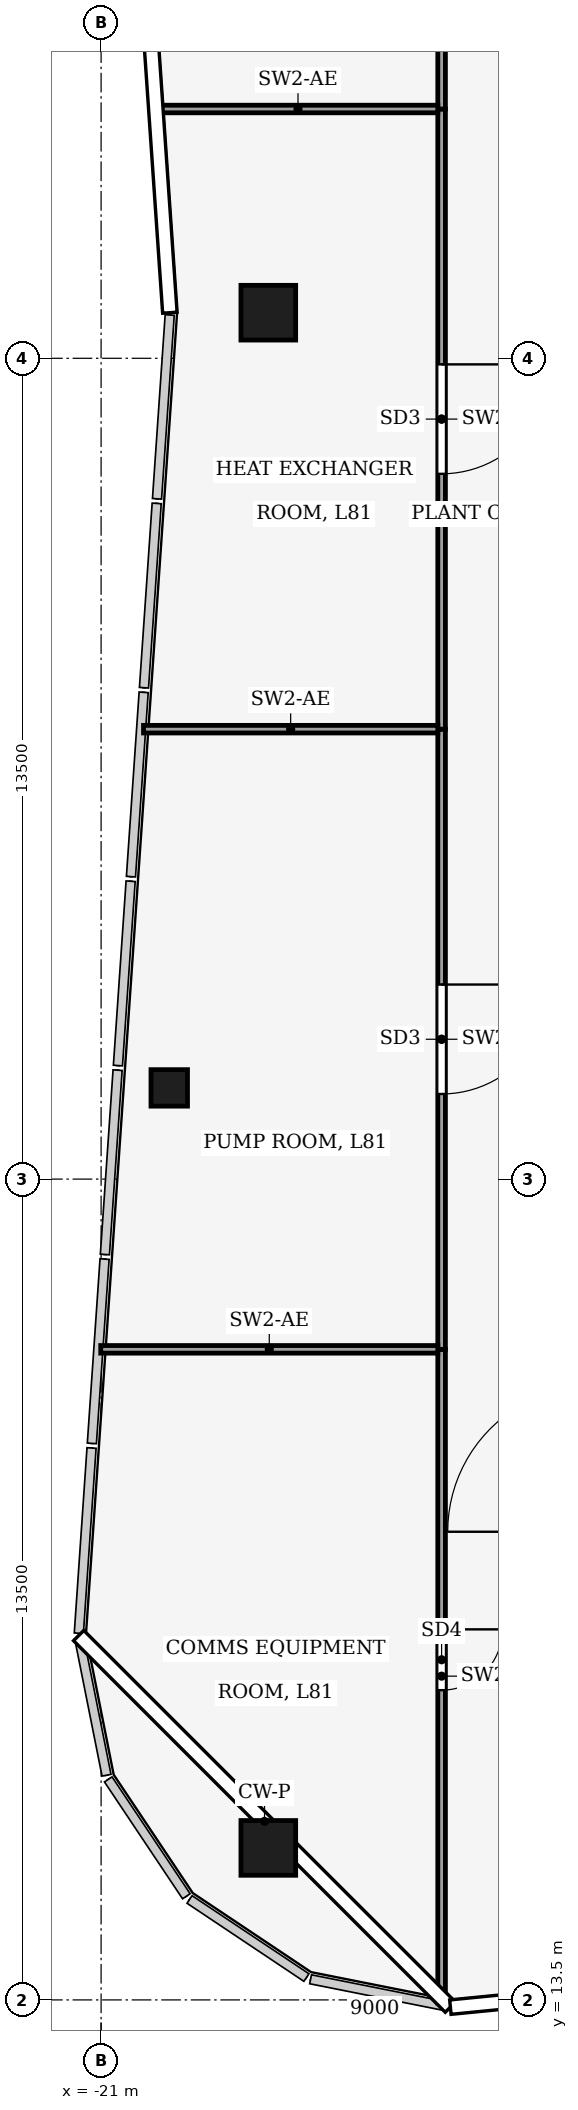
"""IFC4 building model, lengths in metres.
Left out: names, types, materials, properties, quantities, classifications, styles, units other than length and angle.
Written with IfcOpenShell. Run it as: python <this file> out.ifc"""

import sys

from ifc_helpers import new_model, si_unit, direction, frame, frame_2d, origin, origin_2d, place, context, subcontext, project, spatial, rectangle, hollow_rectangle, extrude, element, fill, save


model = new_model("IFC4")
c1 = context("Model", 3, precision=1e-05, world=origin(), true_north=direction((0.0, 1.0)))
c2 = subcontext(c1, "Body", "Model", "MODEL_VIEW")
j1 = project(units=[si_unit("LENGTHUNIT", "METRE"), si_unit("PLANEANGLEUNIT", "RADIAN")], contexts=[c1])
p1 = place(None, origin())
s1 = spatial("IfcSite", under=j1, at=p1, CompositionType="ELEMENT")
p2 = place(p1, origin())
s2 = spatial("IfcBuilding", under=s1, at=p2, CompositionType="ELEMENT")
p3 = place(p2, frame((0.0, 0.0, 359.5)))
s3 = spatial("IfcBuildingStorey", under=s2, at=p3, CompositionType="ELEMENT", Elevation=359.5)
for number, where, z_axis, x_axis in (
    (1, (-18.25, 16.0, 0.0), (0.0, 0.0, 1.0), (1.0, 0.0, 0.0)),
    (2, (-18.25, 41.25, 0.0), (0.0, 0.0, 1.0), (1.0, 0.0, 0.0)),
):
    element("IfcColumn", number, at=place(p3, frame(where, z_axis=z_axis, x_axis=x_axis)), inside=s3, PredefinedType="COLUMN", context=c2, shape_type="SweptSolid", body=[
        extrude(hollow_rectangle(XDim=0.9, YDim=0.9, WallThickness=0.04, at=origin_2d()), origin(), (0.0, 0.0, 1.0), 4.5),
    ])
p4 = place(p3, frame((-19.879, 28.5, 0.0), z_axis=(0.0, 0.0, 1.0), x_axis=(1.0, 0.0, 0.0)))
e3 = element("IfcColumn", 3, at=p4, inside=s3, PredefinedType="COLUMN", context=c2, shape_type="SweptSolid", body=[
    extrude(hollow_rectangle(XDim=0.6, YDim=0.6, WallThickness=0.025, at=origin_2d()), origin(), (0.0, 0.0, 1.0), 4.5),
])
p5 = place(p3, frame((-15.4, 24.2, 0.0), z_axis=(0.0, 0.0, 1.0), x_axis=(0.0, -1.0, 0.0)))
e4 = element("IfcWall", 4, at=p5, inside=s3, PredefinedType="PARTITIONING", context=c2, shape_type="SweptSolid", body=[
    extrude(rectangle(XDim=10.75, YDim=0.125, at=frame_2d((5.375, 0.0))), origin(), (0.0, 0.0, 1.0), 3.312),
])
p6 = place(p5, frame((4.605, 0.0, 0.0)))
e5 = element("IfcOpeningElement", 5, at=p6, cuts=e4, PredefinedType="OPENING", context=c2, shape_type="SweptSolid", body=[
    extrude(rectangle(XDim=1.0, YDim=2.1, at=frame_2d((0.5, 1.05))), frame((0.0, 0.073, 0.0), z_axis=(0.0, -1.0, 0.0), x_axis=(1.0, 0.0, 0.0)), (0.0, 0.0, 1.0), 0.145),
])
p7 = place(p3, frame((-15.4, 34.4, 0.0), z_axis=(0.0, 0.0, 1.0), x_axis=(0.0, -1.0, 0.0)))
e6 = element("IfcWall", 6, at=p7, inside=s3, PredefinedType="PARTITIONING", context=c2, shape_type="SweptSolid", body=[
    extrude(rectangle(XDim=10.2, YDim=0.125, at=frame_2d((5.1, 0.0))), origin(), (0.0, 0.0, 1.0), 4.02),
])
p8 = place(p7, frame((4.2, 0.0, 0.0)))
e7 = element("IfcOpeningElement", 7, at=p8, cuts=e6, PredefinedType="OPENING", context=c2, shape_type="SweptSolid", body=[
    extrude(rectangle(XDim=1.8, YDim=2.4, at=frame_2d((0.9, 1.2))), frame((0.0, 0.073, 0.0), z_axis=(0.0, -1.0, 0.0), x_axis=(1.0, 0.0, 0.0)), (0.0, 0.0, 1.0), 0.145),
])
p9 = place(p3, frame((-15.4, 44.6, 0.0), z_axis=(0.0, 0.0, 1.0), x_axis=(0.0, -1.0, 0.0)))
e8 = element("IfcWall", 8, at=p9, inside=s3, PredefinedType="PARTITIONING", context=c2, shape_type="SweptSolid", body=[
    extrude(rectangle(XDim=10.2, YDim=0.125, at=frame_2d((5.1, 0.0))), origin(), (0.0, 0.0, 1.0), 3.62),
])
p10 = place(p9, frame((4.2, 0.0, 0.0)))
e9 = element("IfcOpeningElement", 9, at=p10, cuts=e8, PredefinedType="OPENING", context=c2, shape_type="SweptSolid", body=[
    extrude(rectangle(XDim=1.8, YDim=2.4, at=frame_2d((0.9, 1.2))), frame((0.0, 0.073, 0.0), z_axis=(0.0, -1.0, 0.0), x_axis=(1.0, 0.0, 0.0)), (0.0, 0.0, 1.0), 0.145),
])
p11 = place(p3, frame((-15.4, 54.8, 0.0), z_axis=(0.0, 0.0, 1.0), x_axis=(0.0, -1.0, 0.0)))
e10 = element("IfcWall", 10, at=p11, inside=s3, PredefinedType="PARTITIONING", context=c2, shape_type="SweptSolid", body=[
    extrude(rectangle(XDim=10.2, YDim=0.125, at=frame_2d((5.1, 0.0))), origin(), (0.0, 0.0, 1.0), 3.83),
])
p12 = place(p11, frame((4.6, 0.0, 0.0)))
e11 = element("IfcOpeningElement", 11, at=p12, cuts=e10, PredefinedType="OPENING", context=c2, shape_type="SweptSolid", body=[
    extrude(rectangle(XDim=1.0, YDim=2.1, at=frame_2d((0.5, 1.05))), frame((0.0, 0.073, 0.0), z_axis=(0.0, -1.0, 0.0), x_axis=(1.0, 0.0, 0.0)), (0.0, 0.0, 1.0), 0.145),
])
p13 = place(p3, frame((-21.006, 24.2, 0.0), z_axis=(0.0, 0.0, 1.0), x_axis=(1.0, 0.0, 0.0)))
e12 = element("IfcWall", 12, at=p13, inside=s3, PredefinedType="PARTITIONING", context=c2, shape_type="SweptSolid", body=[
    extrude(rectangle(XDim=5.543, YDim=0.125, at=frame_2d((2.772, 0.0))), origin(), (0.0, 0.0, 1.0), 3.52),
])
p14 = place(p3, frame((-20.302, 34.4, 0.0), z_axis=(0.0, 0.0, 1.0), x_axis=(1.0, 0.0, 0.0)))
e13 = element("IfcWall", 13, at=p14, inside=s3, PredefinedType="PARTITIONING", context=c2, shape_type="SweptSolid", body=[
    extrude(rectangle(XDim=4.84, YDim=0.125, at=frame_2d((2.42, 0.0))), origin(), (0.0, 0.0, 1.0), 3.52),
])
p15 = place(p3, frame((-20.061, 44.6, 0.0), z_axis=(0.0, 0.0, 1.0), x_axis=(1.0, 0.0, 0.0)))
e14 = element("IfcWall", 14, at=p15, inside=s3, PredefinedType="PARTITIONING", context=c2, shape_type="SweptSolid", body=[
    extrude(rectangle(XDim=4.599, YDim=0.125, at=frame_2d((2.299, 0.0))), origin(), (0.0, 0.0, 1.0), 3.52),
])
p16 = place(p6, origin())
e15 = element("IfcDoor", 15, at=p16, inside=s3, OperationType="SINGLE_SWING_LEFT", PredefinedType="DOOR", context=c2, shape_type="SweptSolid", body=[
    extrude(rectangle(XDim=1.0, YDim=2.1, at=frame_2d((0.5, 1.05))), frame((0.0, 0.025, 0.0), z_axis=(0.0, -1.0, 0.0), x_axis=(1.0, 0.0, 0.0)), (0.0, 0.0, 1.0), 0.05),
])
fill(e5, e15)
p17 = place(p8, origin())
e16 = element("IfcDoor", 16, at=p17, inside=s3, OperationType="DOUBLE_DOOR_SINGLE_SWING", PredefinedType="DOOR", context=c2, shape_type="SweptSolid", body=[
    extrude(rectangle(XDim=1.8, YDim=2.4, at=frame_2d((0.9, 1.2))), frame((0.0, 0.025, 0.0), z_axis=(0.0, -1.0, 0.0), x_axis=(1.0, 0.0, 0.0)), (0.0, 0.0, 1.0), 0.05),
])
fill(e7, e16)
p18 = place(p10, origin())
e17 = element("IfcDoor", 17, at=p18, inside=s3, OperationType="DOUBLE_DOOR_SINGLE_SWING", PredefinedType="DOOR", context=c2, shape_type="SweptSolid", body=[
    extrude(rectangle(XDim=1.8, YDim=2.4, at=frame_2d((0.9, 1.2))), frame((0.0, 0.025, 0.0), z_axis=(0.0, -1.0, 0.0), x_axis=(1.0, 0.0, 0.0)), (0.0, 0.0, 1.0), 0.05),
])
fill(e9, e17)
save(model, sys.argv[1])
